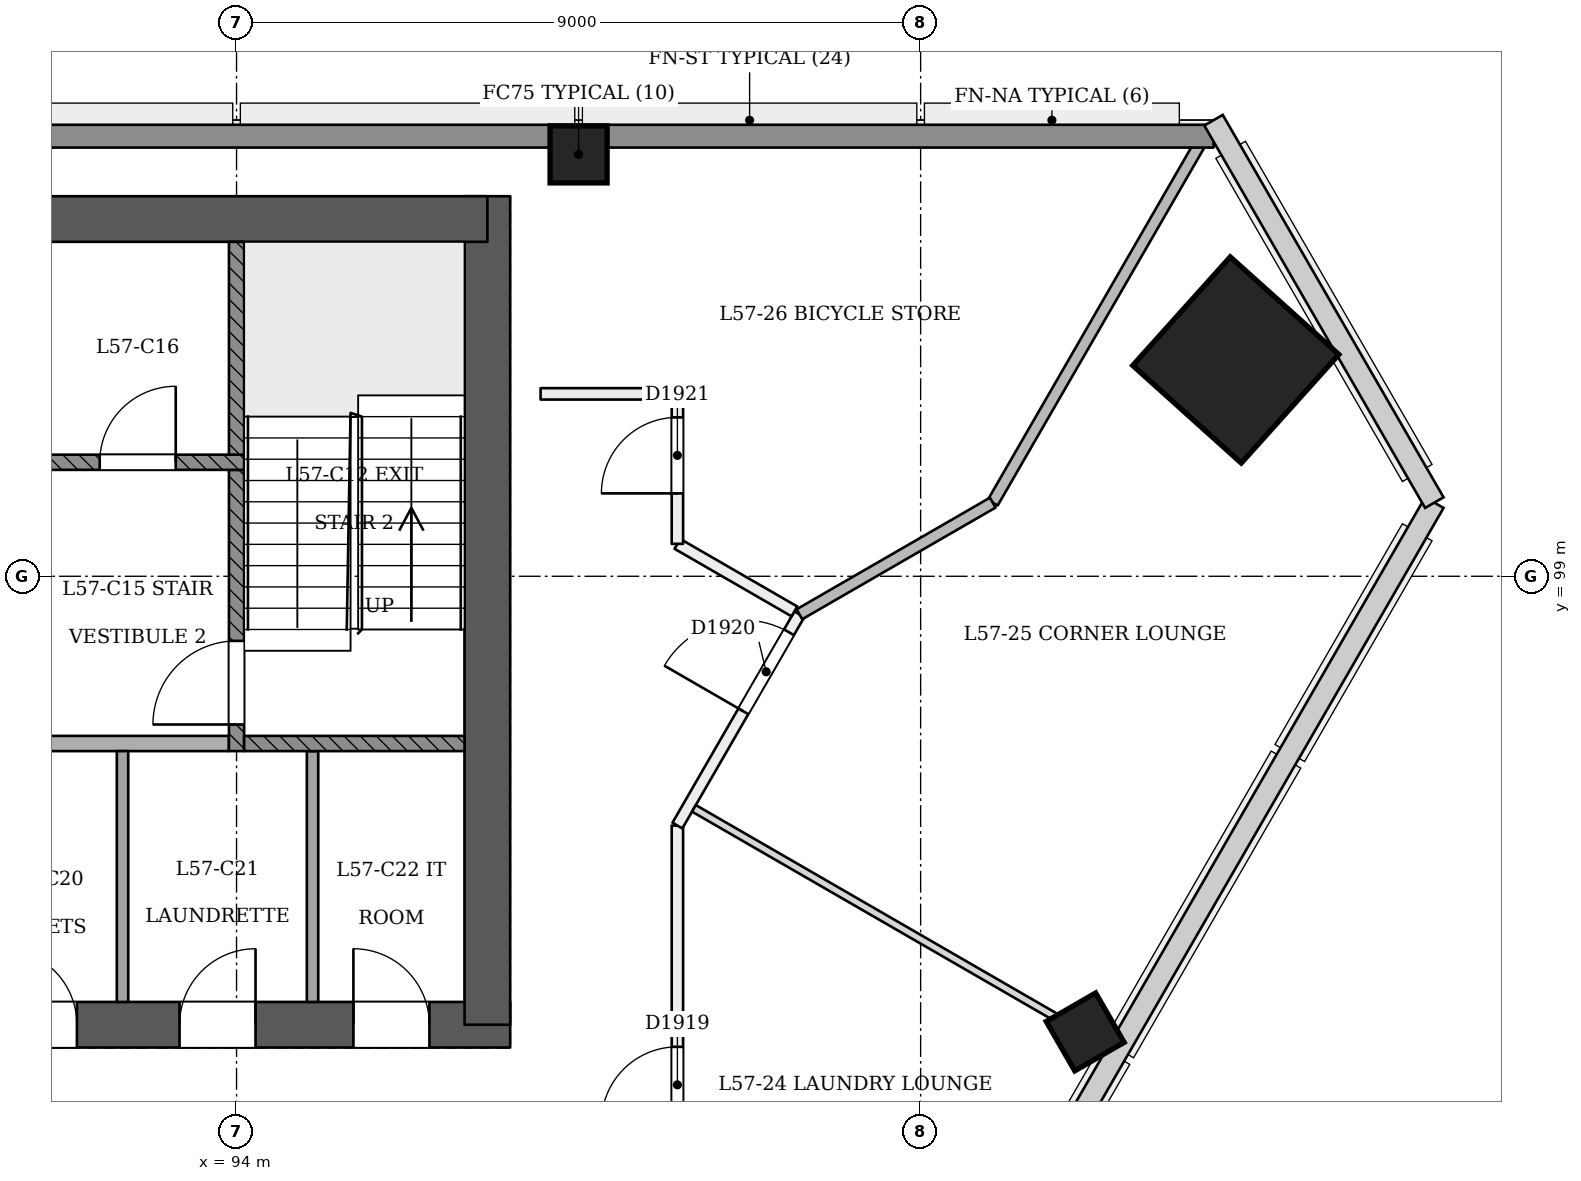
"""IFC4 building model, lengths in metres.
Left out: names, types, materials, properties, quantities, classifications, styles, units other than length and angle.
Written with IfcOpenShell. Run it as: python <this file> out.ifc"""

import sys

from ifc_helpers import new_model, si_unit, direction, frame, frame_2d, origin, origin_2d, place, context, subcontext, project, spatial, rectangle, extrude, element, fill, save


model = new_model("IFC4")
c1 = context("Model", 3, precision=1e-05, world=origin(), true_north=direction((0.0, 1.0)))
c2 = subcontext(c1, "Body", "Model", "MODEL_VIEW")
j1 = project(units=[si_unit("LENGTHUNIT", "METRE"), si_unit("PLANEANGLEUNIT", "RADIAN")], contexts=[c1])
p1 = place(None, origin())
s1 = spatial("IfcSite", under=j1, at=p1, CompositionType="ELEMENT")
p2 = place(p1, origin())
s2 = spatial("IfcBuilding", under=s1, at=p2, CompositionType="ELEMENT")
p3 = place(p2, frame((0.0, 0.0, 223.0)))
s3 = spatial("IfcBuildingStorey", under=s2, at=p3, CompositionType="ELEMENT", Elevation=223.0)
p4 = place(p3, frame((72.7, 93.1, 0.0), z_axis=(0.0, 0.0, 1.0), x_axis=(1.0, 0.0, 0.0)))
e1 = element("IfcWall", 1, at=p4, inside=s3, PredefinedType="SHEAR", context=c2, shape_type="SweptSolid", body=[
    extrude(rectangle(XDim=24.9, YDim=0.6, at=frame_2d((12.45, 0.0))), origin(), (0.0, 0.0, 1.0), 3.6),
])
p5 = place(p4, frame((1.1, 0.0, 0.0)))
e2 = element("IfcOpeningElement", 2, at=p5, cuts=e1, PredefinedType="OPENING", context=c2, shape_type="SweptSolid", body=[
    extrude(rectangle(XDim=1.2, YDim=2.1, at=frame_2d((0.6, 1.05))), frame((0.0, 0.311, 0.0), z_axis=(0.0, -1.0, 0.0), x_axis=(1.0, 0.0, 0.0)), (0.0, 0.0, 1.0), 0.621),
])
p6 = place(p4, frame((3.3, 0.0, 0.0)))
e3 = element("IfcOpeningElement", 3, at=p6, cuts=e1, PredefinedType="OPENING", context=c2, shape_type="SweptSolid", body=[
    extrude(rectangle(XDim=1.2, YDim=2.1, at=frame_2d((0.6, 1.05))), frame((0.0, 0.311, 0.0), z_axis=(0.0, -1.0, 0.0), x_axis=(1.0, 0.0, 0.0)), (0.0, 0.0, 1.0), 0.621),
])
p7 = place(p4, frame((13.3, 0.0, 0.0)))
e4 = element("IfcOpeningElement", 4, at=p7, cuts=e1, PredefinedType="OPENING", context=c2, shape_type="SweptSolid", body=[
    extrude(rectangle(XDim=1.2, YDim=2.1, at=frame_2d((0.6, 1.05))), frame((0.0, 0.311, 0.0), z_axis=(0.0, -1.0, 0.0), x_axis=(1.0, 0.0, 0.0)), (0.0, 0.0, 1.0), 0.621),
])
p8 = place(p4, frame((15.762, 0.0, 0.0)))
e5 = element("IfcOpeningElement", 5, at=p8, cuts=e1, PredefinedType="OPENING", context=c2, shape_type="SweptSolid", body=[
    extrude(rectangle(XDim=1.0, YDim=2.1, at=frame_2d((0.5, 1.05))), frame((0.0, 0.311, 0.0), z_axis=(0.0, -1.0, 0.0), x_axis=(1.0, 0.0, 0.0)), (0.0, 0.0, 1.0), 0.621),
])
p9 = place(p4, frame((18.2, 0.0, 0.0)))
e6 = element("IfcOpeningElement", 6, at=p9, cuts=e1, PredefinedType="OPENING", context=c2, shape_type="SweptSolid", body=[
    extrude(rectangle(XDim=1.0, YDim=2.1, at=frame_2d((0.5, 1.05))), frame((0.0, 0.311, 0.0), z_axis=(0.0, -1.0, 0.0), x_axis=(1.0, 0.0, 0.0)), (0.0, 0.0, 1.0), 0.621),
])
p10 = place(p4, frame((20.55, 0.0, 0.0)))
e7 = element("IfcOpeningElement", 7, at=p10, cuts=e1, PredefinedType="OPENING", context=c2, shape_type="SweptSolid", body=[
    extrude(rectangle(XDim=1.0, YDim=2.1, at=frame_2d((0.5, 1.05))), frame((0.0, 0.311, 0.0), z_axis=(0.0, -1.0, 0.0), x_axis=(1.0, 0.0, 0.0)), (0.0, 0.0, 1.0), 0.621),
])
p11 = place(p4, frame((22.837, 0.0, 0.0)))
e8 = element("IfcOpeningElement", 8, at=p11, cuts=e1, PredefinedType="OPENING", context=c2, shape_type="SweptSolid", body=[
    extrude(rectangle(XDim=1.0, YDim=2.1, at=frame_2d((0.5, 1.05))), frame((0.0, 0.311, 0.0), z_axis=(0.0, -1.0, 0.0), x_axis=(1.0, 0.0, 0.0)), (0.0, 0.0, 1.0), 0.621),
])
p12 = place(p3, frame((97.3, 93.1, 0.0), z_axis=(0.0, 0.0, 1.0), x_axis=(0.0, 1.0, 0.0)))
e9 = element("IfcWall", 9, at=p12, inside=s3, PredefinedType="SHEAR", context=c2, shape_type="SweptSolid", body=[
    extrude(rectangle(XDim=10.9, YDim=0.6, at=frame_2d((5.45, 0.0))), origin(), (0.0, 0.0, 1.0), 3.6),
])
p13 = place(p3, frame((97.3, 103.7, 0.0), z_axis=(0.0, 0.0, 1.0), x_axis=(-1.0, 0.0, 0.0)))
e10 = element("IfcWall", 10, at=p13, inside=s3, PredefinedType="SHEAR", context=c2, shape_type="SweptSolid", body=[
    extrude(rectangle(XDim=24.9, YDim=0.6, at=frame_2d((12.45, 0.0))), origin(), (0.0, 0.0, 1.0), 3.6),
])
p14 = place(p3, frame((107.18, 101.834, 0.0), z_axis=(-0.028401814599, 0.009218727412, 0.999554076572), x_axis=(0.500752366939, -0.865305621507, 0.022209196139)))
e11 = element("IfcColumn", 11, at=p14, inside=s3, PredefinedType="COLUMN", context=c2, shape_type="SweptSolid", body=[
    extrude(rectangle(XDim=1.92, YDim=1.92, at=origin_2d()), origin(), (0.0, 0.0, 1.0), 3.602),
])
p15 = place(p3, frame((98.5, 104.55, 0.0), z_axis=(0.0, 0.0, 1.0), x_axis=(1.0, 0.0, 0.0)))
e12 = element("IfcColumn", 12, at=p15, inside=s3, PredefinedType="COLUMN", context=c2, shape_type="SweptSolid", body=[
    extrude(rectangle(XDim=0.75, YDim=0.75, at=origin_2d()), origin(), (0.0, 0.0, 1.0), 3.6),
])
p16 = place(p3, frame((105.192, 92.958, -0.023), z_axis=(-0.022222852987, 0.038483477124, 0.999012095419), x_axis=(-0.500172632104, -0.865640589271, 0.022219547737)))
e13 = element("IfcColumn", 13, at=p16, inside=s3, PredefinedType="COLUMN", context=c2, shape_type="SweptSolid", body=[
    extrude(rectangle(XDim=0.75, YDim=0.75, at=origin_2d()), origin(), (0.0, 0.0, 1.0), 3.604),
])
p17 = place(p3, frame((99.8, 90.876, 0.0), z_axis=(0.0, 0.0, 1.0), x_axis=(0.0, 1.0, 0.0)))
e14 = element("IfcWall", 14, at=p17, inside=s3, PredefinedType="PARTITIONING", context=c2, shape_type="SweptSolid", body=[
    extrude(rectangle(XDim=4.844, YDim=0.15, at=frame_2d((2.422, 0.0))), origin(), (0.0, 0.0, 1.0), 3.2),
])
p18 = place(p17, frame((0.933, 0.0, 0.0)))
e15 = element("IfcOpeningElement", 15, at=p18, cuts=e14, PredefinedType="OPENING", context=c2, shape_type="SweptSolid", body=[
    extrude(rectangle(XDim=1.0, YDim=2.1, at=frame_2d((0.5, 1.05))), frame((0.0, 0.085, 0.0), z_axis=(0.0, -1.0, 0.0), x_axis=(1.0, 0.0, 0.0)), (0.0, 0.0, 1.0), 0.171),
])
p19 = place(p3, frame((99.8, 95.72, 0.0), z_axis=(0.0, 0.0, 1.0), x_axis=(0.499992422807, 0.866029778435, 0.0)))
e16 = element("IfcWall", 16, at=p19, inside=s3, PredefinedType="PARTITIONING", context=c2, shape_type="SweptSolid", body=[
    extrude(rectangle(XDim=3.209, YDim=0.15, at=frame_2d((1.605, 0.0))), origin(), (0.0, 0.0, 1.0), 3.2),
])
p20 = place(p19, frame((1.736, 0.0, 0.0)))
e17 = element("IfcOpeningElement", 17, at=p20, cuts=e16, PredefinedType="OPENING", context=c2, shape_type="SweptSolid", body=[
    extrude(rectangle(XDim=1.2, YDim=2.1, at=frame_2d((0.6, 1.05))), frame((0.0, 0.085, 0.0), z_axis=(0.0, -1.0, 0.0), x_axis=(1.0, 0.0, 0.0)), (0.0, 0.0, 1.0), 0.171),
])
p21 = place(p3, frame((101.34, 98.538, 0.0), z_axis=(0.0, 0.0, 1.0), x_axis=(-0.866046103619, 0.499964145121, 0.0)))
e18 = element("IfcWall", 18, at=p21, inside=s3, PredefinedType="PARTITIONING", context=c2, shape_type="SweptSolid", body=[
    extrude(rectangle(XDim=1.778, YDim=0.15, at=frame_2d((0.889, 0.0))), origin(), (0.0, 0.0, 1.0), 3.2),
])
p22 = place(p3, frame((99.8, 99.427, 0.0), z_axis=(0.0, 0.0, 1.0), x_axis=(0.0, 1.0, 0.0)))
e19 = element("IfcWall", 19, at=p22, inside=s3, PredefinedType="PARTITIONING", context=c2, shape_type="SweptSolid", body=[
    extrude(rectangle(XDim=1.973, YDim=0.15, at=frame_2d((0.987, 0.0))), origin(), (0.0, 0.0, 1.0), 3.2),
])
p23 = place(p22, frame((0.664, 0.0, 0.0)))
e20 = element("IfcOpeningElement", 20, at=p23, cuts=e19, PredefinedType="OPENING", context=c2, shape_type="SweptSolid", body=[
    extrude(rectangle(XDim=1.0, YDim=2.1, at=frame_2d((0.5, 1.05))), frame((0.0, 0.085, 0.0), z_axis=(0.0, -1.0, 0.0), x_axis=(1.0, 0.0, 0.0)), (0.0, 0.0, 1.0), 0.171),
])
p24 = place(p3, frame((99.725, 101.4, 0.0), z_axis=(0.0, 0.0, 1.0), x_axis=(-1.0, 0.0, 0.0)))
e21 = element("IfcWall", 21, at=p24, inside=s3, PredefinedType="PARTITIONING", context=c2, shape_type="SweptSolid", body=[
    extrude(rectangle(XDim=1.725, YDim=0.15, at=frame_2d((0.863, 0.0))), origin(), (0.0, 0.0, 1.0), 3.2),
])
p25 = place(p3, frame((105.495, 92.784, 0.0), z_axis=(0.0, 0.0, 1.0), x_axis=(-0.866015887322, 0.500016482634, 0.0)))
e22 = element("IfcWall", 22, at=p25, inside=s3, PredefinedType="PARTITIONING", context=c2, shape_type="SweptSolid", body=[
    extrude(rectangle(XDim=6.325, YDim=0.1, at=frame_2d((3.163, 0.0))), origin(), (0.0, 0.0, 1.0), 2.7),
])
p26 = place(p3, frame((106.796, 104.9, 0.0), z_axis=(0.0, 0.0, 1.0), x_axis=(-0.500008252402, -0.866020639205, 0.0)))
e23 = element("IfcWall", 23, at=p26, inside=s3, PredefinedType="PARTITIONING", context=c2, shape_type="SweptSolid", body=[
    extrude(rectangle(XDim=5.694, YDim=0.15, at=frame_2d((2.847, 0.0))), origin(), (0.0, 0.0, 1.0), 2.7),
])
p27 = place(p3, frame((103.949, 99.969, 0.0), z_axis=(0.0, 0.0, 1.0), x_axis=(-0.866009827712, -0.500026977578, 0.0)))
e24 = element("IfcWall", 24, at=p27, inside=s3, PredefinedType="PARTITIONING", context=c2, shape_type="SweptSolid", body=[
    extrude(rectangle(XDim=2.938, YDim=0.15, at=frame_2d((1.469, 0.0))), origin(), (0.0, 0.0, 1.0), 3.2),
])
p28 = place(p3, frame((63.146, 104.79, 0.0), z_axis=(0.0, 0.0, 1.0), x_axis=(1.0, 0.0, 0.0)))
e25 = element("IfcWall", 25, at=p28, inside=s3, PredefinedType="SOLIDWALL", context=c2, shape_type="SweptSolid", body=[
    extrude(rectangle(XDim=43.708, YDim=0.3, at=frame_2d((21.854, 0.0))), origin(), (0.0, 0.0, 1.0), 2.7),
])
for number, where, z_axis, x_axis in (
    (26, (92.5, 93.4, 0.0), (0.0, 0.0, 1.0), (0.0, 1.0, 0.0)),
    (27, (95.0, 93.4, 0.0), (0.0, 0.0, 1.0), (0.0, 1.0, 0.0)),
):
    element("IfcWall", number, at=place(p3, frame(where, z_axis=z_axis, x_axis=x_axis)), inside=s3, PredefinedType="PARTITIONING", context=c2, shape_type="SweptSolid", body=[
        extrude(rectangle(XDim=3.3, YDim=0.15, at=frame_2d((1.65, 0.0))), origin(), (0.0, 0.0, 1.0), 3.2),
    ])
p29 = place(p3, frame((91.5, 96.8, 0.0), z_axis=(0.0, 0.0, 1.0), x_axis=(1.0, 0.0, 0.0)))
e28 = element("IfcWall", 28, at=p29, inside=s3, PredefinedType="PARTITIONING", context=c2, shape_type="SweptSolid", body=[
    extrude(rectangle(XDim=2.4, YDim=0.2, at=frame_2d((1.2, 0.0))), origin(), (0.0, 0.0, 1.0), 3.2),
])
p30 = place(p3, frame((94.0, 96.7, 0.0), z_axis=(0.0, 0.0, 1.0), x_axis=(0.0, 1.0, 0.0)))
e29 = element("IfcWall", 29, at=p30, inside=s3, PredefinedType="SOLIDWALL", context=c2, shape_type="SweptSolid", body=[
    extrude(rectangle(XDim=3.7, YDim=0.2, at=frame_2d((1.85, 0.0))), origin(), (0.0, 0.0, 1.0), 3.2),
])
p31 = place(p30, frame((0.35, 0.0, 0.0)))
e30 = element("IfcOpeningElement", 30, at=p31, cuts=e29, PredefinedType="OPENING", context=c2, shape_type="SweptSolid", body=[
    extrude(rectangle(XDim=1.1, YDim=2.1, at=frame_2d((0.55, 1.05))), frame((0.0, 0.11, 0.0), z_axis=(0.0, -1.0, 0.0), x_axis=(1.0, 0.0, 0.0)), (0.0, 0.0, 1.0), 0.221),
])
p32 = place(p3, frame((94.1, 96.8, 0.0), z_axis=(0.0, 0.0, 1.0), x_axis=(1.0, 0.0, 0.0)))
e31 = element("IfcWall", 31, at=p32, inside=s3, PredefinedType="SOLIDWALL", context=c2, shape_type="SweptSolid", body=[
    extrude(rectangle(XDim=2.9, YDim=0.2, at=frame_2d((1.45, 0.0))), origin(), (0.0, 0.0, 1.0), 3.2),
])
p33 = place(p3, frame((75.9, 100.5, 0.0), z_axis=(0.0, 0.0, 1.0), x_axis=(1.0, 0.0, 0.0)))
e32 = element("IfcWall", 32, at=p33, inside=s3, PredefinedType="SOLIDWALL", context=c2, shape_type="SweptSolid", body=[
    extrude(rectangle(XDim=18.2, YDim=0.2, at=frame_2d((9.1, 0.0))), origin(), (0.0, 0.0, 1.0), 3.2),
])
p34 = place(p33, frame((2.6, 0.0, 0.0)))
e33 = element("IfcOpeningElement", 33, at=p34, cuts=e32, PredefinedType="OPENING", context=c2, shape_type="SweptSolid", body=[
    extrude(rectangle(XDim=1.1, YDim=2.1, at=frame_2d((0.55, 1.05))), frame((0.0, 0.11, 0.0), z_axis=(0.0, -1.0, 0.0), x_axis=(1.0, 0.0, 0.0)), (0.0, 0.0, 1.0), 0.221),
])
p35 = place(p33, frame((4.5, 0.0, 0.0)))
e34 = element("IfcOpeningElement", 34, at=p35, cuts=e32, PredefinedType="OPENING", context=c2, shape_type="SweptSolid", body=[
    extrude(rectangle(XDim=1.1, YDim=2.1, at=frame_2d((0.55, 1.05))), frame((0.0, 0.11, 0.0), z_axis=(0.0, -1.0, 0.0), x_axis=(1.0, 0.0, 0.0)), (0.0, 0.0, 1.0), 0.221),
])
p36 = place(p33, frame((6.4, 0.0, 0.0)))
e35 = element("IfcOpeningElement", 35, at=p36, cuts=e32, PredefinedType="OPENING", context=c2, shape_type="SweptSolid", body=[
    extrude(rectangle(XDim=1.1, YDim=2.1, at=frame_2d((0.55, 1.05))), frame((0.0, 0.11, 0.0), z_axis=(0.0, -1.0, 0.0), x_axis=(1.0, 0.0, 0.0)), (0.0, 0.0, 1.0), 0.221),
])
p37 = place(p33, frame((8.3, 0.0, 0.0)))
e36 = element("IfcOpeningElement", 36, at=p37, cuts=e32, PredefinedType="OPENING", context=c2, shape_type="SweptSolid", body=[
    extrude(rectangle(XDim=1.1, YDim=2.1, at=frame_2d((0.55, 1.05))), frame((0.0, 0.11, 0.0), z_axis=(0.0, -1.0, 0.0), x_axis=(1.0, 0.0, 0.0)), (0.0, 0.0, 1.0), 0.221),
])
p38 = place(p33, frame((10.2, 0.0, 0.0)))
e37 = element("IfcOpeningElement", 37, at=p38, cuts=e32, PredefinedType="OPENING", context=c2, shape_type="SweptSolid", body=[
    extrude(rectangle(XDim=1.1, YDim=2.1, at=frame_2d((0.55, 1.05))), frame((0.0, 0.11, 0.0), z_axis=(0.0, -1.0, 0.0), x_axis=(1.0, 0.0, 0.0)), (0.0, 0.0, 1.0), 0.221),
])
p39 = place(p33, frame((12.1, 0.0, 0.0)))
e38 = element("IfcOpeningElement", 38, at=p39, cuts=e32, PredefinedType="OPENING", context=c2, shape_type="SweptSolid", body=[
    extrude(rectangle(XDim=1.1, YDim=2.1, at=frame_2d((0.55, 1.05))), frame((0.0, 0.11, 0.0), z_axis=(0.0, -1.0, 0.0), x_axis=(1.0, 0.0, 0.0)), (0.0, 0.0, 1.0), 0.221),
])
p40 = place(p33, frame((14.0, 0.0, 0.0)))
e39 = element("IfcOpeningElement", 39, at=p40, cuts=e32, PredefinedType="OPENING", context=c2, shape_type="SweptSolid", body=[
    extrude(rectangle(XDim=1.1, YDim=2.1, at=frame_2d((0.55, 1.05))), frame((0.0, 0.11, 0.0), z_axis=(0.0, -1.0, 0.0), x_axis=(1.0, 0.0, 0.0)), (0.0, 0.0, 1.0), 0.221),
])
p41 = place(p33, frame((0.65, 0.0, 0.0)))
e40 = element("IfcOpeningElement", 40, at=p41, cuts=e32, PredefinedType="OPENING", context=c2, shape_type="SweptSolid", body=[
    extrude(rectangle(XDim=1.0, YDim=2.1, at=frame_2d((0.5, 1.05))), frame((0.0, 0.11, 0.0), z_axis=(0.0, -1.0, 0.0), x_axis=(1.0, 0.0, 0.0)), (0.0, 0.0, 1.0), 0.221),
])
p42 = place(p33, frame((16.3, 0.0, 0.0)))
e41 = element("IfcOpeningElement", 41, at=p42, cuts=e32, PredefinedType="OPENING", context=c2, shape_type="SweptSolid", body=[
    extrude(rectangle(XDim=1.0, YDim=2.1, at=frame_2d((0.5, 1.05))), frame((0.0, 0.11, 0.0), z_axis=(0.0, -1.0, 0.0), x_axis=(1.0, 0.0, 0.0)), (0.0, 0.0, 1.0), 0.221),
])
p43 = place(p3, frame((94.0, 100.6, 0.0), z_axis=(0.0, 0.0, 1.0), x_axis=(0.0, 1.0, 0.0)))
e42 = element("IfcWall", 42, at=p43, inside=s3, PredefinedType="SOLIDWALL", context=c2, shape_type="SweptSolid", body=[
    extrude(rectangle(XDim=2.8, YDim=0.2, at=frame_2d((1.4, 0.0))), origin(), (0.0, 0.0, 1.0), 3.2),
])
p44 = place(p18, origin())
e43 = element("IfcDoor", 43, at=p44, inside=s3, OperationType="SINGLE_SWING_LEFT", PredefinedType="NOTDEFINED", context=c2, shape_type="SweptSolid", body=[
    extrude(rectangle(XDim=1.0, YDim=2.1, at=frame_2d((0.5, 1.05))), frame((0.0, 0.025, 0.0), z_axis=(0.0, -1.0, 0.0), x_axis=(1.0, 0.0, 0.0)), (0.0, 0.0, 1.0), 0.05),
])
fill(e15, e43)
p45 = place(p20, origin())
e44 = element("IfcDoor", 44, at=p45, inside=s3, OperationType="SINGLE_SWING_LEFT", PredefinedType="NOTDEFINED", context=c2, shape_type="SweptSolid", body=[
    extrude(rectangle(XDim=1.2, YDim=2.1, at=frame_2d((0.6, 1.05))), frame((0.0, 0.025, 0.0), z_axis=(0.0, -1.0, 0.0), x_axis=(1.0, 0.0, 0.0)), (0.0, 0.0, 1.0), 0.05),
])
fill(e17, e44)
p46 = place(p23, origin())
e45 = element("IfcDoor", 45, at=p46, inside=s3, OperationType="SINGLE_SWING_LEFT", PredefinedType="NOTDEFINED", context=c2, shape_type="SweptSolid", body=[
    extrude(rectangle(XDim=1.0, YDim=2.1, at=frame_2d((0.5, 1.05))), frame((0.0, 0.025, 0.0), z_axis=(0.0, -1.0, 0.0), x_axis=(1.0, 0.0, 0.0)), (0.0, 0.0, 1.0), 0.05),
])
fill(e20, e45)
p47 = place(p31, origin())
e46 = element("IfcDoor", 46, at=p47, inside=s3, OperationType="SINGLE_SWING_LEFT", PredefinedType="NOTDEFINED", context=c2, shape_type="SweptSolid", body=[
    extrude(rectangle(XDim=1.1, YDim=2.1, at=frame_2d((0.55, 1.05))), frame((0.0, 0.025, 0.0), z_axis=(0.0, -1.0, 0.0), x_axis=(1.0, 0.0, 0.0)), (0.0, 0.0, 1.0), 0.05),
])
fill(e30, e46)
p48 = place(p42, origin())
e47 = element("IfcDoor", 47, at=p48, inside=s3, OperationType="SINGLE_SWING_RIGHT", PredefinedType="NOTDEFINED", context=c2, shape_type="SweptSolid", body=[
    extrude(rectangle(XDim=1.0, YDim=2.1, at=frame_2d((0.5, 1.05))), frame((0.0, 0.025, 0.0), z_axis=(0.0, -1.0, 0.0), x_axis=(1.0, 0.0, 0.0)), (0.0, 0.0, 1.0), 0.05),
])
fill(e41, e47)
p49 = place(p9, origin())
e48 = element("IfcDoor", 48, at=p49, inside=s3, OperationType="SINGLE_SWING_LEFT", PredefinedType="NOTDEFINED", context=c2, shape_type="SweptSolid", body=[
    extrude(rectangle(XDim=1.0, YDim=2.1, at=frame_2d((0.5, 1.05))), frame((0.0, 0.025, 0.0), z_axis=(0.0, -1.0, 0.0), x_axis=(1.0, 0.0, 0.0)), (0.0, 0.0, 1.0), 0.05),
])
fill(e6, e48)
p50 = place(p10, origin())
e49 = element("IfcDoor", 49, at=p50, inside=s3, OperationType="SINGLE_SWING_RIGHT", PredefinedType="NOTDEFINED", context=c2, shape_type="SweptSolid", body=[
    extrude(rectangle(XDim=1.0, YDim=2.1, at=frame_2d((0.5, 1.05))), frame((0.0, 0.025, 0.0), z_axis=(0.0, -1.0, 0.0), x_axis=(1.0, 0.0, 0.0)), (0.0, 0.0, 1.0), 0.05),
])
fill(e7, e49)
p51 = place(p11, origin())
e50 = element("IfcDoor", 50, at=p51, inside=s3, OperationType="SINGLE_SWING_LEFT", PredefinedType="NOTDEFINED", context=c2, shape_type="SweptSolid", body=[
    extrude(rectangle(XDim=1.0, YDim=2.1, at=frame_2d((0.5, 1.05))), frame((0.0, 0.025, 0.0), z_axis=(0.0, -1.0, 0.0), x_axis=(1.0, 0.0, 0.0)), (0.0, 0.0, 1.0), 0.05),
])
fill(e8, e50)
save(model, sys.argv[1])
